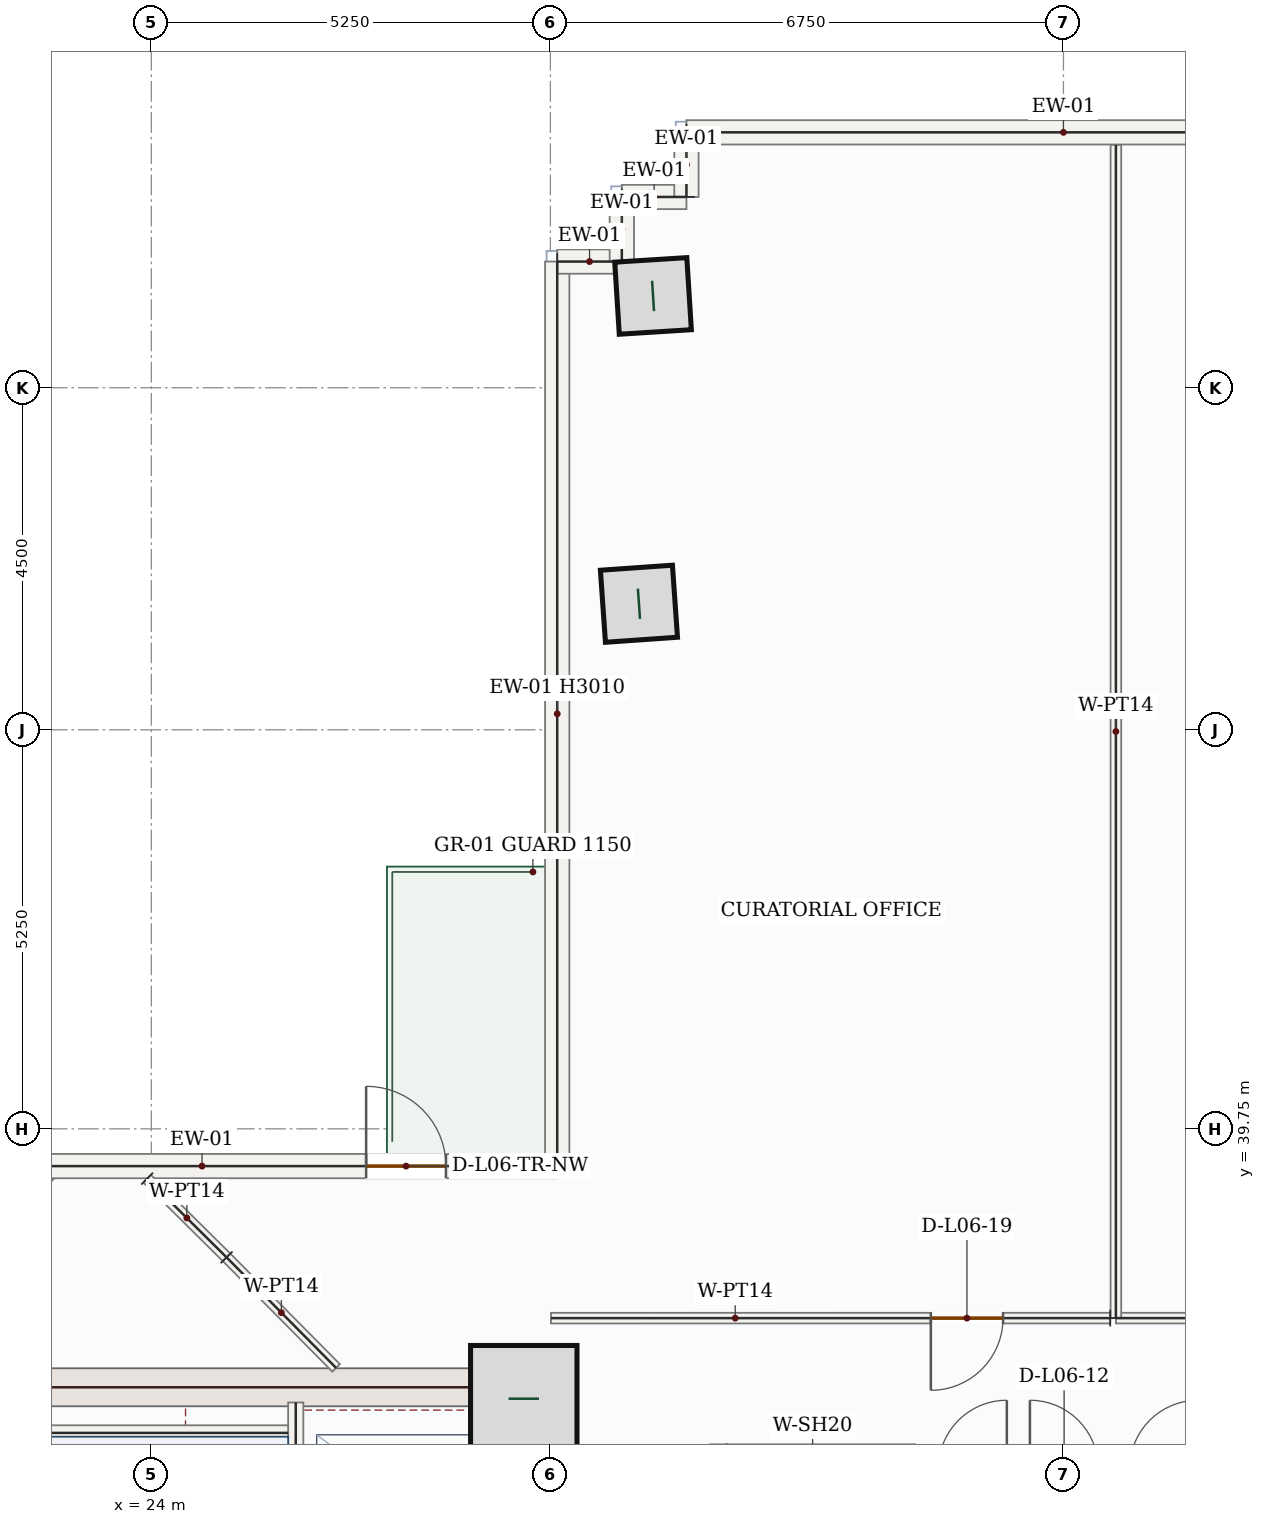
"""IFC4 building model, lengths in metres.
Left out: names, types, materials, properties, quantities, classifications, styles, units other than length and angle.
Written with IfcOpenShell. Run it as: python <this file> out.ifc"""

import sys

from ifc_helpers import new_model, si_unit, direction, frame, frame_2d, origin, origin_2d, place, context, subcontext, project, spatial, rectangle, hollow_rectangle, extrude, source, transform, mapped, element, fill, save


model = new_model("IFC4")
c1 = context("Model", 3, precision=1e-05, world=origin(), true_north=direction((0.0, 1.0)))
c2 = subcontext(c1, "Body", "Model", "MODEL_VIEW")
j1 = project(units=[si_unit("LENGTHUNIT", "METRE"), si_unit("PLANEANGLEUNIT", "RADIAN")], contexts=[c1])
p1 = place(None, origin())
s1 = spatial("IfcSite", under=j1, at=p1, CompositionType="ELEMENT")
p2 = place(p1, origin())
s2 = spatial("IfcBuilding", under=s1, at=p2, CompositionType="ELEMENT")
p3 = place(p2, frame((0.0, 0.0, 33.3)))
s3 = spatial("IfcBuildingStorey", under=s2, at=p3, CompositionType="ELEMENT", Elevation=33.3)
p4 = place(p3, frame((29.0, 28.05, 0.0), z_axis=(0.0, 0.0, 1.0), x_axis=(0.0, 1.0, 0.0)))
e1 = element("IfcWall", 1, at=p4, inside=s3, PredefinedType="SHEAR", context=c2, shape_type="SweptSolid", body=[
    extrude(rectangle(XDim=8.55, YDim=0.5, at=frame_2d((4.275, 0.0))), origin(), (0.0, 0.0, 1.0), 3.95),
])
p5 = place(p4, frame((1.5, 0.0, 0.0)))
e2 = element("IfcOpeningElement", 2, at=p5, cuts=e1, PredefinedType="OPENING", context=c2, shape_type="SweptSolid", body=[
    extrude(rectangle(XDim=1.1, YDim=2.2, at=frame_2d((0.55, 1.1))), frame((0.0, 0.26, 0.0), z_axis=(0.0, -1.0, 0.0), x_axis=(1.0, 0.0, 0.0)), (0.0, 0.0, 1.0), 0.52),
])
m1 = source(origin(), c2, "Body", "SweptSolid", [
    extrude(rectangle(XDim=7.0, YDim=0.5, at=frame_2d((3.5, 0.0))), origin(), (0.0, 0.0, 1.0), 3.95),
])
p6 = place(p3, frame((21.75, 36.35, 0.0), z_axis=(0.0, 0.0, 1.0), x_axis=(1.0, 0.0, 0.0)))
e3 = element("IfcWall", 3, at=p6, inside=s3, PredefinedType="SHEAR", context=c2, shape_type="MappedRepresentation", body=[
    mapped(m1, transform((0.0, 0.0, 0.0), x_axis=(1.0, 0.0, 0.0), y_axis=(0.0, 1.0, 0.0), z_axis=(0.0, 0.0, 1.0), scale=1.0)),
])
m2 = source(origin(), c2, "Body", "SweptSolid", [
    extrude(rectangle(XDim=1.4, YDim=1.4, at=origin_2d()), origin(), (0.0, 0.0, 1.0), 4.2),
])
p7 = place(p3, frame((28.9, 36.2, 0.0), z_axis=(0.0, 0.0, 1.0), x_axis=(1.0, 0.0, 0.0)))
e4 = element("IfcColumn", 4, at=p7, inside=s3, PredefinedType="COLUMN", context=c2, shape_type="MappedRepresentation", body=[
    mapped(m2, transform((0.0, 0.0, 0.0), x_axis=(1.0, 0.0, 0.0), y_axis=(0.0, 1.0, 0.0), z_axis=(0.0, 0.0, 1.0), scale=1.0)),
])
m3 = source(origin(), c2, "Body", "SweptSolid", [
    extrude(hollow_rectangle(XDim=0.95, YDim=0.95, WallThickness=0.05, at=origin_2d()), origin(), (0.0, 0.0, 1.0), 4.2),
])
for number, where, z_axis, x_axis in (
    (5, (30.415, 46.658, 0.0), (0.0, 0.0, 1.0), (-0.07, 0.998, 0.0)),
    (6, (30.601, 50.708, 0.0), (0.0, 0.0, 1.0), (-0.063, 0.998, 0.0)),
):
    element("IfcColumn", number, at=place(p3, frame(where, z_axis=z_axis, x_axis=x_axis)), inside=s3, PredefinedType="COLUMN", context=c2, shape_type="MappedRepresentation", body=[
        mapped(m3, transform((0.0, 0.0, 0.0), x_axis=(1.0, 0.0, 0.0), y_axis=(0.0, 1.0, 0.0), z_axis=(0.0, 0.0, 1.0), scale=1.0)),
    ])
m4 = source(origin(), c2, "Body", "SweptSolid", [
    extrude(rectangle(XDim=5.258, YDim=0.32, at=frame_2d((2.629, 0.0))), origin(), (0.0, 0.0, 1.0), 3.95),
])
p8 = place(p3, frame((18.94, 35.542, 0.0), z_axis=(0.0, 0.0, 1.0), x_axis=(0.707106781187, 0.707106781187, 0.0)))
e7 = element("IfcWall", 7, at=p8, inside=s3, PredefinedType="SOLIDWALL", context=c2, shape_type="MappedRepresentation", body=[
    mapped(m4, transform((0.0, 0.0, 0.0), x_axis=(1.0, 0.0, 0.0), y_axis=(0.0, 1.0, 0.0), z_axis=(0.0, 0.0, 1.0), scale=1.0)),
])
p9 = place(p3, frame((22.658, 39.26, 0.0), z_axis=(0.0, 0.0, 1.0), x_axis=(1.0, 0.0, 0.0)))
e8 = element("IfcWall", 8, at=p9, inside=s3, PredefinedType="SOLIDWALL", context=c2, shape_type="SweptSolid", body=[
    extrude(rectangle(XDim=6.682, YDim=0.32, at=frame_2d((3.341, 0.0))), origin(), (0.0, 0.0, 1.0), 3.95),
])
p10 = place(p9, frame((4.168, 0.0, 0.0)))
e9 = element("IfcOpeningElement", 9, at=p10, cuts=e8, PredefinedType="OPENING", context=c2, shape_type="SweptSolid", body=[
    extrude(rectangle(XDim=1.05, YDim=2.15, at=frame_2d((0.525, 1.075))), frame((0.0, 0.17, 0.0), z_axis=(0.0, -1.0, 0.0), x_axis=(1.0, 0.0, 0.0)), (0.0, 0.0, 1.0), 0.34),
])
m5 = source(origin(), c2, "Body", "SweptSolid", [
    extrude(rectangle(XDim=11.9, YDim=0.32, at=frame_2d((5.95, 0.0))), origin(), (0.0, 0.0, 1.0), 3.01),
])
p11 = place(p3, frame((29.34, 39.26, 0.0), z_axis=(0.0, 0.0, 1.0), x_axis=(0.0, 1.0, 0.0)))
e10 = element("IfcWall", 10, at=p11, inside=s3, PredefinedType="SOLIDWALL", context=c2, shape_type="MappedRepresentation", body=[
    mapped(m5, transform((0.0, 0.0, 0.0), x_axis=(1.0, 0.0, 0.0), y_axis=(0.0, 1.0, 0.0), z_axis=(0.0, 0.0, 1.0), scale=1.0)),
])
m6 = source(origin(), c2, "Body", "SweptSolid", [
    extrude(rectangle(XDim=0.85, YDim=0.32, at=frame_2d((0.425, 0.0))), origin(), (0.0, 0.0, 1.0), 3.95),
])
p12 = place(p3, frame((29.34, 51.16, 0.0), z_axis=(0.0, 0.0, 1.0), x_axis=(1.0, 0.0, 0.0)))
e11 = element("IfcWall", 11, at=p12, inside=s3, PredefinedType="SOLIDWALL", context=c2, shape_type="MappedRepresentation", body=[
    mapped(m6, transform((0.0, 0.0, 0.0), x_axis=(1.0, 0.0, 0.0), y_axis=(0.0, 1.0, 0.0), z_axis=(0.0, 0.0, 1.0), scale=1.0)),
])
m7 = source(origin(), c2, "Body", "SweptSolid", [
    extrude(rectangle(XDim=0.85, YDim=0.32, at=frame_2d((0.425, 0.0))), origin(), (0.0, 0.0, 1.0), 3.95),
])
for number, where, z_axis, x_axis in (
    (12, (30.19, 51.16, 0.0), (0.0, 0.0, 1.0), (0.0, 1.0, 0.0)),
    (13, (30.19, 52.01, 0.0), (0.0, 0.0, 1.0), (1.0, 0.0, 0.0)),
    (14, (31.04, 52.01, 0.0), (0.0, 0.0, 1.0), (0.0, 1.0, 0.0)),
):
    element("IfcWall", number, at=place(p3, frame(where, z_axis=z_axis, x_axis=x_axis)), inside=s3, PredefinedType="SOLIDWALL", context=c2, shape_type="MappedRepresentation", body=[
        mapped(m7, transform((0.0, 0.0, 0.0), x_axis=(1.0, 0.0, 0.0), y_axis=(0.0, 1.0, 0.0), z_axis=(0.0, 0.0, 1.0), scale=1.0)),
    ])
m8 = source(origin(), c2, "Body", "SweptSolid", [
    extrude(rectangle(XDim=9.92, YDim=0.32, at=frame_2d((4.96, 0.0))), origin(), (0.0, 0.0, 1.0), 3.95),
])
p13 = place(p3, frame((31.04, 52.86, 0.0), z_axis=(0.0, 0.0, 1.0), x_axis=(1.0, 0.0, 0.0)))
e15 = element("IfcWall", 15, at=p13, inside=s3, PredefinedType="SOLIDWALL", context=c2, shape_type="MappedRepresentation", body=[
    mapped(m8, transform((0.0, 0.0, 0.0), x_axis=(1.0, 0.0, 0.0), y_axis=(0.0, 1.0, 0.0), z_axis=(0.0, 0.0, 1.0), scale=1.0)),
])
p14 = place(p3, frame((25.9, 28.15, 0.0), z_axis=(0.0, 0.0, 1.0), x_axis=(0.0, 1.0, 0.0)))
e16 = element("IfcWall", 16, at=p14, inside=s3, PredefinedType="SOLIDWALL", context=c2, shape_type="SweptSolid", body=[
    extrude(rectangle(XDim=8.0, YDim=0.2, at=frame_2d((4.0, 0.0))), origin(), (0.0, 0.0, 1.0), 3.95),
])
p15 = place(p14, frame((0.4, 0.0, 0.0)))
e17 = element("IfcOpeningElement", 17, at=p15, cuts=e16, PredefinedType="OPENING", context=c2, shape_type="SweptSolid", body=[
    extrude(rectangle(XDim=1.05, YDim=2.15, at=frame_2d((0.525, 1.075))), frame((0.0, 0.11, 0.0), z_axis=(0.0, -1.0, 0.0), x_axis=(1.0, 0.0, 0.0)), (0.0, 0.0, 1.0), 0.22),
])
m9 = source(origin(), c2, "Body", "SweptSolid", [
    extrude(rectangle(XDim=3.25, YDim=0.2, at=frame_2d((1.625, 0.0))), origin(), (0.0, 0.0, 1.0), 3.95),
])
p16 = place(p3, frame((22.55, 35.75, 0.0), z_axis=(0.0, 0.0, 1.0), x_axis=(1.0, 0.0, 0.0)))
e18 = element("IfcWall", 18, at=p16, inside=s3, PredefinedType="SOLIDWALL", context=c2, shape_type="MappedRepresentation", body=[
    mapped(m9, transform((0.0, 0.0, 0.0), x_axis=(1.0, 0.0, 0.0), y_axis=(0.0, 1.0, 0.0), z_axis=(0.0, 0.0, 1.0), scale=1.0)),
])
m10 = source(origin(), c2, "Body", "SweptSolid", [
    extrude(rectangle(XDim=2.4, YDim=0.2, at=frame_2d((1.2, 0.0))), origin(), (0.0, 0.0, 1.0), 3.95),
])
for number, where, z_axis, x_axis in (
    (19, (31.45, 33.2, 0.0), (0.0, 0.0, 1.0), (0.0, 1.0, 0.0)),
    (20, (33.95, 33.2, 0.0), (0.0, 0.0, 1.0), (0.0, 1.0, 0.0)),
):
    element("IfcWall", number, at=place(p3, frame(where, z_axis=z_axis, x_axis=x_axis)), inside=s3, PredefinedType="SOLIDWALL", context=c2, shape_type="MappedRepresentation", body=[
        mapped(m10, transform((0.0, 0.0, 0.0), x_axis=(1.0, 0.0, 0.0), y_axis=(0.0, 1.0, 0.0), z_axis=(0.0, 0.0, 1.0), scale=1.0)),
    ])
m11 = source(origin(), c2, "Body", "SweptSolid", [
    extrude(rectangle(XDim=1.471, YDim=0.14, at=frame_2d((0.736, 0.0))), origin(), (0.0, 0.0, 1.0), 3.95),
])
p17 = place(p3, frame((23.945, 39.095, 0.0), z_axis=(0.0, 0.0, 1.0), x_axis=(0.710417151562, -0.703780840011, 0.0)))
e21 = element("IfcWall", 21, at=p17, inside=s3, PredefinedType="PARTITIONING", context=c2, shape_type="MappedRepresentation", body=[
    mapped(m11, transform((0.0, 0.0, 0.0), x_axis=(1.0, 0.0, 0.0), y_axis=(0.0, 1.0, 0.0), z_axis=(0.0, 0.0, 1.0), scale=1.0)),
])
m12 = source(origin(), c2, "Body", "SweptSolid", [
    extrude(rectangle(XDim=2.047, YDim=0.14, at=frame_2d((1.024, 0.0))), origin(), (0.0, 0.0, 1.0), 3.95),
])
p18 = place(p3, frame((24.99, 38.059, 0.0), z_axis=(0.0, 0.0, 1.0), x_axis=(0.703819772346, -0.710378580797, 0.0)))
e22 = element("IfcWall", 22, at=p18, inside=s3, PredefinedType="PARTITIONING", context=c2, shape_type="MappedRepresentation", body=[
    mapped(m12, transform((0.0, 0.0, 0.0), x_axis=(1.0, 0.0, 0.0), y_axis=(0.0, 1.0, 0.0), z_axis=(0.0, 0.0, 1.0), scale=1.0)),
])
p19 = place(p3, frame((42.742, 37.26, 0.0), z_axis=(0.0, 0.0, 1.0), x_axis=(-0.999999999186, 4.0337219e-05, 0.0)))
e23 = element("IfcWall", 23, at=p19, inside=s3, PredefinedType="PARTITIONING", context=c2, shape_type="SweptSolid", body=[
    extrude(rectangle(XDim=6.052, YDim=0.14, at=frame_2d((3.026, 0.0))), origin(), (0.0, 0.0, 1.0), 3.95),
])
p20 = place(p19, frame((3.98, 0.0, 0.0)))
e24 = element("IfcOpeningElement", 24, at=p20, cuts=e23, PredefinedType="OPENING", context=c2, shape_type="SweptSolid", body=[
    extrude(rectangle(XDim=0.95, YDim=2.15, at=frame_2d((0.475, 1.075))), frame((0.0, 0.08, 0.0), z_axis=(0.0, -1.0, 0.0), x_axis=(1.0, 0.0, 0.0)), (0.0, 0.0, 1.0), 0.16),
])
m13 = source(origin(), c2, "Body", "SweptSolid", [
    extrude(rectangle(XDim=15.435, YDim=0.14, at=frame_2d((7.718, 0.0))), origin(), (0.0, 0.0, 1.0), 3.95),
])
p21 = place(p3, frame((36.69, 37.26, 0.0), z_axis=(0.0, 0.0, 1.0), x_axis=(0.0, 1.0, 0.0)))
e25 = element("IfcWall", 25, at=p21, inside=s3, PredefinedType="PARTITIONING", context=c2, shape_type="MappedRepresentation", body=[
    mapped(m13, transform((0.0, 0.0, 0.0), x_axis=(1.0, 0.0, 0.0), y_axis=(0.0, 1.0, 0.0), z_axis=(0.0, 0.0, 1.0), scale=1.0)),
])
p22 = place(p3, frame((36.615, 37.26, 0.0), z_axis=(0.0, 0.0, 1.0), x_axis=(-0.999999999449, -3.3182904e-05, 0.0)))
e26 = element("IfcWall", 26, at=p22, inside=s3, PredefinedType="PARTITIONING", context=c2, shape_type="SweptSolid", body=[
    extrude(rectangle(XDim=7.357, YDim=0.14, at=frame_2d((3.679, 0.0))), origin(), (0.0, 0.0, 1.0), 3.95),
])
p23 = place(p22, frame((1.41, 0.0, 0.0)))
e27 = element("IfcOpeningElement", 27, at=p23, cuts=e26, PredefinedType="OPENING", context=c2, shape_type="SweptSolid", body=[
    extrude(rectangle(XDim=0.95, YDim=2.15, at=frame_2d((0.475, 1.075))), frame((0.0, 0.08, 0.0), z_axis=(0.0, -1.0, 0.0), x_axis=(1.0, 0.0, 0.0)), (0.0, 0.0, 1.0), 0.16),
])
m14 = source(origin(), c2, "Body", "SweptSolid", [
    extrude(rectangle(XDim=1.05, YDim=2.15, at=frame_2d((0.525, 1.075))), frame((0.0, 0.025, 0.0), z_axis=(0.0, -1.0, 0.0), x_axis=(1.0, 0.0, 0.0)), (0.0, 0.0, 1.0), 0.05),
])
p24 = place(p10, origin())
e28 = element("IfcDoor", 28, at=p24, inside=s3, OperationType="SINGLE_SWING_LEFT", PredefinedType="DOOR", context=c2, shape_type="MappedRepresentation", body=[
    mapped(m14, transform((0.0, 0.0, 0.0), x_axis=(1.0, 0.0, 0.0), y_axis=(0.0, 1.0, 0.0), z_axis=(0.0, 0.0, 1.0), scale=1.0)),
])
fill(e9, e28)
m15 = source(origin(), c2, "Body", "SweptSolid", [
    extrude(rectangle(XDim=0.95, YDim=2.15, at=frame_2d((0.475, 1.075))), frame((0.0, 0.025, 0.0), z_axis=(0.0, -1.0, 0.0), x_axis=(1.0, 0.0, 0.0)), (0.0, 0.0, 1.0), 0.05),
])
p25 = place(p23, origin())
e29 = element("IfcDoor", 29, at=p25, inside=s3, OperationType="SINGLE_SWING_RIGHT", PredefinedType="DOOR", context=c2, shape_type="MappedRepresentation", body=[
    mapped(m15, transform((0.0, 0.0, 0.0), x_axis=(1.0, 0.0, 0.0), y_axis=(0.0, 1.0, 0.0), z_axis=(0.0, 0.0, 1.0), scale=1.0)),
])
fill(e27, e29)
save(model, sys.argv[1])
